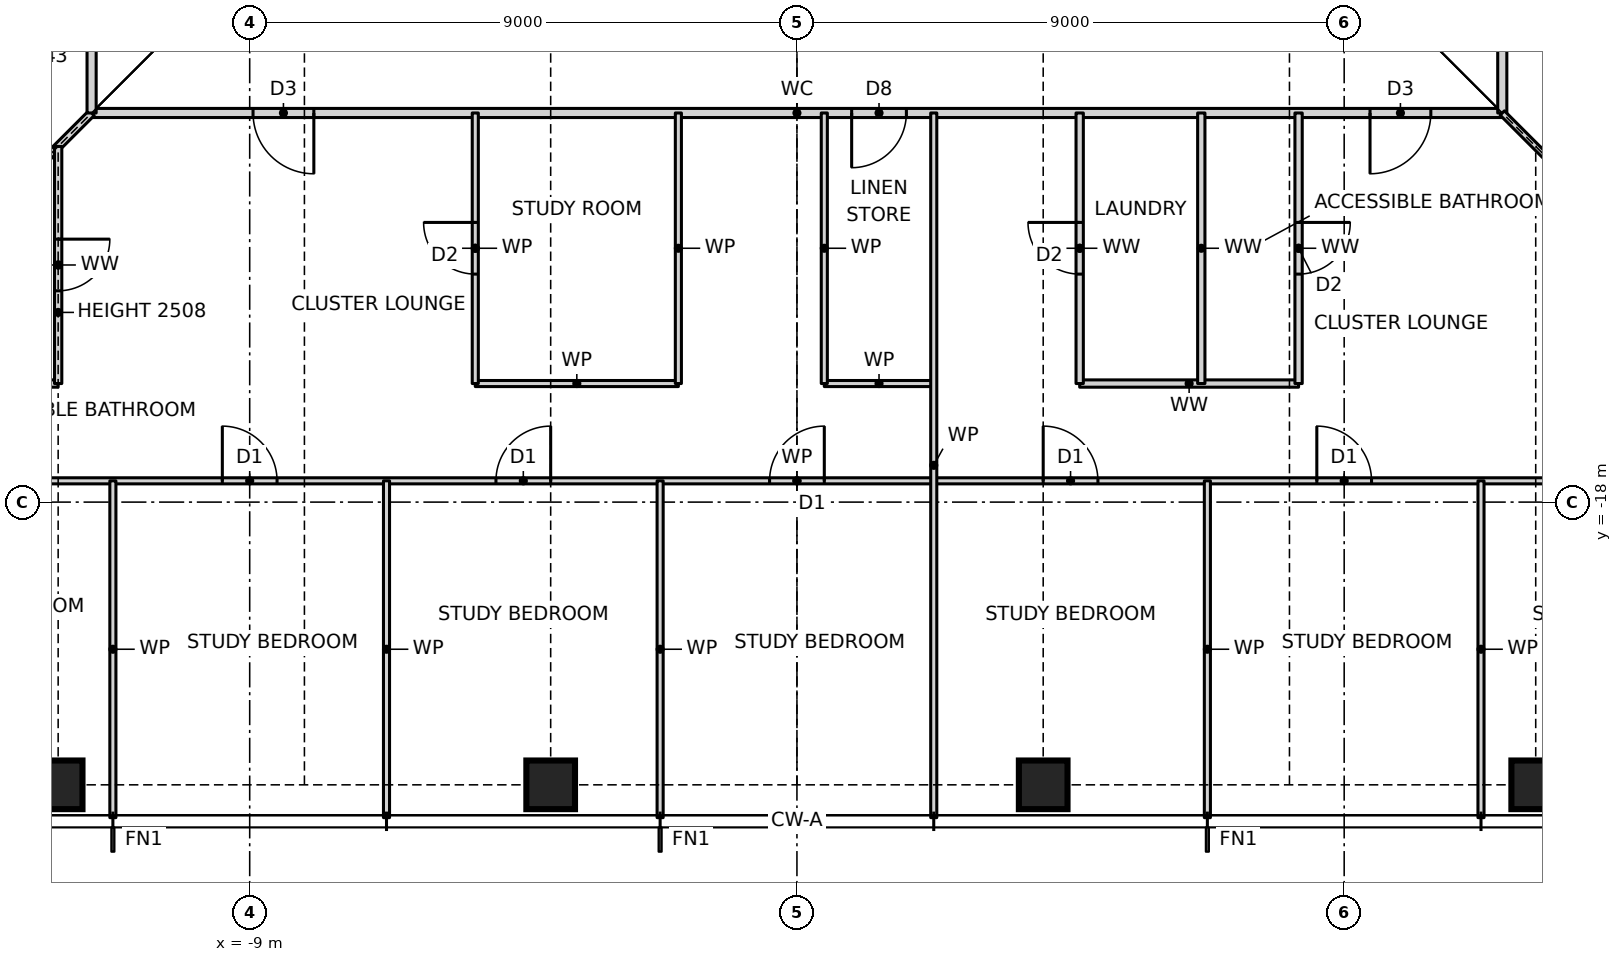
"""IFC4 building model, lengths in metres.
Left out: names, types, materials, properties, quantities, classifications, styles, units other than length and angle.
Written with IfcOpenShell. Run it as: python <this file> out.ifc"""

import sys

from ifc_helpers import new_model, si_unit, direction, frame, frame_2d, origin, origin_2d, place, context, subcontext, project, spatial, rectangle, hollow_rectangle, extrude, element, fill, save


model = new_model("IFC4")
c1 = context("Model", 3, precision=1e-05, world=origin(), true_north=direction((0.0, 1.0)))
c2 = subcontext(c1, "Body", "Model", "MODEL_VIEW")
j1 = project(units=[si_unit("LENGTHUNIT", "METRE"), si_unit("PLANEANGLEUNIT", "RADIAN")], contexts=[c1])
p1 = place(None, origin())
s1 = spatial("IfcSite", under=j1, at=p1, CompositionType="ELEMENT")
p2 = place(p1, origin())
s2 = spatial("IfcBuilding", under=s1, at=p2, CompositionType="ELEMENT")
p3 = place(p2, frame((0.0, 0.0, 60.5)))
s3 = spatial("IfcBuildingStorey", under=s2, at=p3, CompositionType="ELEMENT", Elevation=60.5)
for number, where, z_axis, x_axis in (
    (1, (-12.15, -22.65, 0.0), (0.0, 0.0, 1.0), (1.0, 0.0, 0.0)),
    (2, (-4.05, -22.65, 0.0), (0.0, 0.0, 1.0), (1.0, 0.0, 0.0)),
    (3, (4.05, -22.65, 0.0), (0.0, 0.0, 1.0), (1.0, 0.0, 0.0)),
    (4, (12.15, -22.65, 0.0), (0.0, 0.0, 1.0), (1.0, 0.0, 0.0)),
):
    element("IfcColumn", number, at=place(p3, frame(where, z_axis=z_axis, x_axis=x_axis)), inside=s3, PredefinedType="COLUMN", context=c2, shape_type="SweptSolid", body=[
        extrude(hollow_rectangle(XDim=0.8, YDim=0.8, WallThickness=0.09, at=origin_2d()), origin(), (0.0, 0.0, 1.0), 3.5),
    ])
p4 = place(p3, frame((-15.75, -17.65, 0.0), z_axis=(0.0, 0.0, 1.0), x_axis=(1.0, 0.0, 0.0)))
e5 = element("IfcWall", 5, at=p4, inside=s3, PredefinedType="PARTITIONING", context=c2, shape_type="SweptSolid", body=[
    extrude(rectangle(XDim=31.5, YDim=0.1, at=frame_2d((15.75, 0.0))), origin(), (0.0, 0.0, 1.0), 3.27),
])
p5 = place(p4, frame((1.8, 0.0, 0.0)))
e6 = element("IfcOpeningElement", 6, at=p5, cuts=e5, PredefinedType="OPENING", context=c2, shape_type="SweptSolid", body=[
    extrude(rectangle(XDim=0.9, YDim=2.1, at=frame_2d((0.45, 1.05))), frame((0.0, 0.06, 0.0), z_axis=(0.0, -1.0, 0.0), x_axis=(1.0, 0.0, 0.0)), (0.0, 0.0, 1.0), 0.12),
])
p6 = place(p4, frame((6.3, 0.0, 0.0)))
e7 = element("IfcOpeningElement", 7, at=p6, cuts=e5, PredefinedType="OPENING", context=c2, shape_type="SweptSolid", body=[
    extrude(rectangle(XDim=0.9, YDim=2.1, at=frame_2d((0.45, 1.05))), frame((0.0, 0.06, 0.0), z_axis=(0.0, -1.0, 0.0), x_axis=(1.0, 0.0, 0.0)), (0.0, 0.0, 1.0), 0.12),
])
p7 = place(p4, frame((10.8, 0.0, 0.0)))
e8 = element("IfcOpeningElement", 8, at=p7, cuts=e5, PredefinedType="OPENING", context=c2, shape_type="SweptSolid", body=[
    extrude(rectangle(XDim=0.9, YDim=2.1, at=frame_2d((0.45, 1.05))), frame((0.0, 0.06, 0.0), z_axis=(0.0, -1.0, 0.0), x_axis=(1.0, 0.0, 0.0)), (0.0, 0.0, 1.0), 0.12),
])
p8 = place(p4, frame((15.3, 0.0, 0.0)))
e9 = element("IfcOpeningElement", 9, at=p8, cuts=e5, PredefinedType="OPENING", context=c2, shape_type="SweptSolid", body=[
    extrude(rectangle(XDim=0.9, YDim=2.1, at=frame_2d((0.45, 1.05))), frame((0.0, 0.06, 0.0), z_axis=(0.0, -1.0, 0.0), x_axis=(1.0, 0.0, 0.0)), (0.0, 0.0, 1.0), 0.12),
])
p9 = place(p4, frame((19.8, 0.0, 0.0)))
e10 = element("IfcOpeningElement", 10, at=p9, cuts=e5, PredefinedType="OPENING", context=c2, shape_type="SweptSolid", body=[
    extrude(rectangle(XDim=0.9, YDim=2.1, at=frame_2d((0.45, 1.05))), frame((0.0, 0.06, 0.0), z_axis=(0.0, -1.0, 0.0), x_axis=(1.0, 0.0, 0.0)), (0.0, 0.0, 1.0), 0.12),
])
p10 = place(p4, frame((24.3, 0.0, 0.0)))
e11 = element("IfcOpeningElement", 11, at=p10, cuts=e5, PredefinedType="OPENING", context=c2, shape_type="SweptSolid", body=[
    extrude(rectangle(XDim=0.9, YDim=2.1, at=frame_2d((0.45, 1.05))), frame((0.0, 0.06, 0.0), z_axis=(0.0, -1.0, 0.0), x_axis=(1.0, 0.0, 0.0)), (0.0, 0.0, 1.0), 0.12),
])
p11 = place(p4, frame((28.8, 0.0, 0.0)))
e12 = element("IfcOpeningElement", 12, at=p11, cuts=e5, PredefinedType="OPENING", context=c2, shape_type="SweptSolid", body=[
    extrude(rectangle(XDim=0.9, YDim=2.1, at=frame_2d((0.45, 1.05))), frame((0.0, 0.06, 0.0), z_axis=(0.0, -1.0, 0.0), x_axis=(1.0, 0.0, 0.0)), (0.0, 0.0, 1.0), 0.12),
])
p12 = place(p3, frame((-15.75, -16.05, 0.0), z_axis=(0.0, 0.0, 1.0), x_axis=(1.0, 0.0, 0.0)))
e13 = element("IfcWall", 13, at=p12, inside=s3, PredefinedType="PARTITIONING", context=c2, shape_type="SweptSolid", body=[
    extrude(rectangle(XDim=3.6, YDim=0.12, at=frame_2d((1.8, 0.0))), origin(), (0.0, 0.0, 1.0), 3.27),
])
p13 = place(p3, frame((-5.29, -16.05, 0.0), z_axis=(0.0, 0.0, 1.0), x_axis=(1.0, 0.0, 0.0)))
e14 = element("IfcWall", 14, at=p13, inside=s3, PredefinedType="PARTITIONING", context=c2, shape_type="SweptSolid", body=[
    extrude(rectangle(XDim=3.34, YDim=0.1, at=frame_2d((1.67, 0.0))), origin(), (0.0, 0.0, 1.0), 3.27),
])
p14 = place(p3, frame((0.45, -16.05, 0.0), z_axis=(0.0, 0.0, 1.0), x_axis=(1.0, 0.0, 0.0)))
e15 = element("IfcWall", 15, at=p14, inside=s3, PredefinedType="PARTITIONING", context=c2, shape_type="SweptSolid", body=[
    extrude(rectangle(XDim=1.8, YDim=0.1, at=frame_2d((0.9, 0.0))), origin(), (0.0, 0.0, 1.0), 3.27),
])
p15 = place(p3, frame((4.65, -16.05, 0.0), z_axis=(0.0, 0.0, 1.0), x_axis=(1.0, 0.0, 0.0)))
e16 = element("IfcWall", 16, at=p15, inside=s3, PredefinedType="PARTITIONING", context=c2, shape_type="SweptSolid", body=[
    extrude(rectangle(XDim=3.6, YDim=0.12, at=frame_2d((1.8, 0.0))), origin(), (0.0, 0.0, 1.0), 3.27),
])
p16 = place(p3, frame((-11.6, -11.6, 0.0), z_axis=(0.0, 0.0, 1.0), x_axis=(1.0, 0.0, 0.0)))
e17 = element("IfcWall", 17, at=p16, inside=s3, PredefinedType="PARTITIONING", context=c2, shape_type="SweptSolid", body=[
    extrude(rectangle(XDim=23.2, YDim=0.15, at=frame_2d((11.6, 0.0))), origin(), (0.0, 0.0, 1.0), 3.27),
])
p17 = place(p16, frame((2.655, 0.0, 0.0)))
e18 = element("IfcOpeningElement", 18, at=p17, cuts=e17, PredefinedType="OPENING", context=c2, shape_type="SweptSolid", body=[
    extrude(rectangle(XDim=1.0, YDim=2.1, at=frame_2d((0.5, 1.05))), frame((0.0, 0.085, 0.0), z_axis=(0.0, -1.0, 0.0), x_axis=(1.0, 0.0, 0.0)), (0.0, 0.0, 1.0), 0.17),
])
p18 = place(p16, frame((12.5, 0.0, 0.0)))
e19 = element("IfcOpeningElement", 19, at=p18, cuts=e17, PredefinedType="OPENING", context=c2, shape_type="SweptSolid", body=[
    extrude(rectangle(XDim=0.9, YDim=2.1, at=frame_2d((0.45, 1.05))), frame((0.0, 0.085, 0.0), z_axis=(0.0, -1.0, 0.0), x_axis=(1.0, 0.0, 0.0)), (0.0, 0.0, 1.0), 0.17),
])
p19 = place(p16, frame((21.025, 0.0, 0.0)))
e20 = element("IfcOpeningElement", 20, at=p19, cuts=e17, PredefinedType="OPENING", context=c2, shape_type="SweptSolid", body=[
    extrude(rectangle(XDim=1.0, YDim=2.1, at=frame_2d((0.5, 1.05))), frame((0.0, 0.085, 0.0), z_axis=(0.0, -1.0, 0.0), x_axis=(1.0, 0.0, 0.0)), (0.0, 0.0, 1.0), 0.17),
])
p20 = place(p3, frame((-15.75, -15.75, 0.0), z_axis=(0.0, 0.0, 1.0), x_axis=(0.707106781187, 0.707106781187, 0.0)))
e21 = element("IfcWall", 21, at=p20, inside=s3, PredefinedType="PARTITIONING", context=c2, shape_type="SweptSolid", body=[
    extrude(rectangle(XDim=5.869, YDim=0.12, at=frame_2d((2.935, 0.0))), origin(), (0.0, 0.0, 1.0), 2.343),
])
p21 = place(p3, frame((11.6, -11.6, 0.0), z_axis=(0.0, 0.0, 1.0), x_axis=(0.0, 1.0, 0.0)))
e22 = element("IfcWall", 22, at=p21, inside=s3, PredefinedType="PARTITIONING", context=c2, shape_type="SweptSolid", body=[
    extrude(rectangle(XDim=24.2, YDim=0.15, at=frame_2d((12.1, 0.0))), origin(), (0.0, 0.0, 1.0), 3.27),
])
p22 = place(p21, frame((16.05, 0.0, 0.0)))
e23 = element("IfcOpeningElement", 23, at=p22, cuts=e22, PredefinedType="OPENING", context=c2, shape_type="SweptSolid", body=[
    extrude(rectangle(XDim=1.0, YDim=2.1, at=frame_2d((0.5, 1.05))), frame((0.0, 0.085, 0.0), z_axis=(0.0, -1.0, 0.0), x_axis=(1.0, 0.0, 0.0)), (0.0, 0.0, 1.0), 0.17),
])
p23 = place(p3, frame((11.25, -23.19, 0.0), z_axis=(0.0, 0.0, 1.0), x_axis=(0.0, 1.0, 0.0)))
e24 = element("IfcWall", 24, at=p23, inside=s3, PredefinedType="PARTITIONING", context=c2, shape_type="SweptSolid", body=[
    extrude(rectangle(XDim=5.54, YDim=0.1, at=frame_2d((2.77, 0.0))), origin(), (0.0, 0.0, 1.0), 3.27),
])
p24 = place(p3, frame((8.25, -16.05, 0.0), z_axis=(0.0, 0.0, 1.0), x_axis=(0.0, 1.0, 0.0)))
e25 = element("IfcWall", 25, at=p24, inside=s3, PredefinedType="PARTITIONING", context=c2, shape_type="SweptSolid", body=[
    extrude(rectangle(XDim=4.45, YDim=0.12, at=frame_2d((2.225, 0.0))), origin(), (0.0, 0.0, 1.0), 3.27),
])
p25 = place(p24, frame((1.8, 0.0, 0.0)))
e26 = element("IfcOpeningElement", 26, at=p25, cuts=e25, PredefinedType="OPENING", context=c2, shape_type="SweptSolid", body=[
    extrude(rectangle(XDim=0.85, YDim=2.1, at=frame_2d((0.425, 1.05))), frame((0.0, 0.07, 0.0), z_axis=(0.0, -1.0, 0.0), x_axis=(1.0, 0.0, 0.0)), (0.0, 0.0, 1.0), 0.14),
])
p26 = place(p3, frame((6.75, -23.19, 0.0), z_axis=(0.0, 0.0, 1.0), x_axis=(0.0, 1.0, 0.0)))
e27 = element("IfcWall", 27, at=p26, inside=s3, PredefinedType="PARTITIONING", context=c2, shape_type="SweptSolid", body=[
    extrude(rectangle(XDim=5.54, YDim=0.1, at=frame_2d((2.77, 0.0))), origin(), (0.0, 0.0, 1.0), 3.27),
])
p27 = place(p3, frame((6.65, -16.05, 0.0), z_axis=(0.0, 0.0, 1.0), x_axis=(0.0, 1.0, 0.0)))
e28 = element("IfcWall", 28, at=p27, inside=s3, PredefinedType="PARTITIONING", context=c2, shape_type="SweptSolid", body=[
    extrude(rectangle(XDim=4.45, YDim=0.12, at=frame_2d((2.225, 0.0))), origin(), (0.0, 0.0, 1.0), 3.27),
])
p28 = place(p3, frame((4.65, -16.05, 0.0), z_axis=(0.0, 0.0, 1.0), x_axis=(0.0, 1.0, 0.0)))
e29 = element("IfcWall", 29, at=p28, inside=s3, PredefinedType="PARTITIONING", context=c2, shape_type="SweptSolid", body=[
    extrude(rectangle(XDim=4.45, YDim=0.12, at=frame_2d((2.225, 0.0))), origin(), (0.0, 0.0, 1.0), 3.27),
])
p29 = place(p28, frame((1.8, 0.0, 0.0)))
e30 = element("IfcOpeningElement", 30, at=p29, cuts=e29, PredefinedType="OPENING", context=c2, shape_type="SweptSolid", body=[
    extrude(rectangle(XDim=0.85, YDim=2.1, at=frame_2d((0.425, 1.05))), frame((0.0, 0.07, 0.0), z_axis=(0.0, -1.0, 0.0), x_axis=(1.0, 0.0, 0.0)), (0.0, 0.0, 1.0), 0.14),
])
p30 = place(p3, frame((2.25, -23.19, 0.0), z_axis=(0.0, 0.0, 1.0), x_axis=(0.0, 1.0, 0.0)))
e31 = element("IfcWall", 31, at=p30, inside=s3, PredefinedType="PARTITIONING", context=c2, shape_type="SweptSolid", body=[
    extrude(rectangle(XDim=11.59, YDim=0.1, at=frame_2d((5.795, 0.0))), origin(), (0.0, 0.0, 1.0), 3.27),
])
for number, where, z_axis, x_axis in (
    (32, (0.45, -16.05, 0.0), (0.0, 0.0, 1.0), (0.0, 1.0, 0.0)),
    (33, (-1.95, -16.05, 0.0), (0.0, 0.0, 1.0), (0.0, 1.0, 0.0)),
):
    element("IfcWall", number, at=place(p3, frame(where, z_axis=z_axis, x_axis=x_axis)), inside=s3, PredefinedType="PARTITIONING", context=c2, shape_type="SweptSolid", body=[
        extrude(rectangle(XDim=4.45, YDim=0.1, at=frame_2d((2.225, 0.0))), origin(), (0.0, 0.0, 1.0), 3.27),
    ])
p31 = place(p3, frame((-2.25, -23.19, 0.0), z_axis=(0.0, 0.0, 1.0), x_axis=(0.0, 1.0, 0.0)))
e34 = element("IfcWall", 34, at=p31, inside=s3, PredefinedType="PARTITIONING", context=c2, shape_type="SweptSolid", body=[
    extrude(rectangle(XDim=5.54, YDim=0.1, at=frame_2d((2.77, 0.0))), origin(), (0.0, 0.0, 1.0), 3.27),
])
p32 = place(p3, frame((-5.29, -16.05, 0.0), z_axis=(0.0, 0.0, 1.0), x_axis=(0.0, 1.0, 0.0)))
e35 = element("IfcWall", 35, at=p32, inside=s3, PredefinedType="PARTITIONING", context=c2, shape_type="SweptSolid", body=[
    extrude(rectangle(XDim=4.45, YDim=0.1, at=frame_2d((2.225, 0.0))), origin(), (0.0, 0.0, 1.0), 3.27),
])
p33 = place(p32, frame((1.8, 0.0, 0.0)))
e36 = element("IfcOpeningElement", 36, at=p33, cuts=e35, PredefinedType="OPENING", context=c2, shape_type="SweptSolid", body=[
    extrude(rectangle(XDim=0.85, YDim=2.1, at=frame_2d((0.425, 1.05))), frame((0.0, 0.06, 0.0), z_axis=(0.0, -1.0, 0.0), x_axis=(1.0, 0.0, 0.0)), (0.0, 0.0, 1.0), 0.12),
])
for number, where, z_axis, x_axis in (
    (37, (-6.75, -23.19, 0.0), (0.0, 0.0, 1.0), (0.0, 1.0, 0.0)),
    (38, (-11.25, -23.19, 0.0), (0.0, 0.0, 1.0), (0.0, 1.0, 0.0)),
):
    element("IfcWall", number, at=place(p3, frame(where, z_axis=z_axis, x_axis=x_axis)), inside=s3, PredefinedType="PARTITIONING", context=c2, shape_type="SweptSolid", body=[
        extrude(rectangle(XDim=5.54, YDim=0.1, at=frame_2d((2.77, 0.0))), origin(), (0.0, 0.0, 1.0), 3.27),
    ])
p34 = place(p3, frame((-11.6, -11.6, 0.0), z_axis=(0.0, 0.0, 1.0), x_axis=(0.0, 1.0, 0.0)))
e39 = element("IfcWall", 39, at=p34, inside=s3, PredefinedType="PARTITIONING", context=c2, shape_type="SweptSolid", body=[
    extrude(rectangle(XDim=24.2, YDim=0.15, at=frame_2d((12.1, 0.0))), origin(), (0.0, 0.0, 1.0), 3.27),
])
p35 = place(p34, frame((19.225, 0.0, 0.0)))
e40 = element("IfcOpeningElement", 40, at=p35, cuts=e39, PredefinedType="OPENING", context=c2, shape_type="SweptSolid", body=[
    extrude(rectangle(XDim=1.0, YDim=2.1, at=frame_2d((0.5, 1.05))), frame((0.0, 0.085, 0.0), z_axis=(0.0, -1.0, 0.0), x_axis=(1.0, 0.0, 0.0)), (0.0, 0.0, 1.0), 0.17),
])
p36 = place(p34, frame((3.425, 0.0, 0.0)))
e41 = element("IfcOpeningElement", 41, at=p36, cuts=e39, PredefinedType="OPENING", context=c2, shape_type="SweptSolid", body=[
    extrude(rectangle(XDim=1.0, YDim=2.1, at=frame_2d((0.5, 1.05))), frame((0.0, 0.085, 0.0), z_axis=(0.0, -1.0, 0.0), x_axis=(1.0, 0.0, 0.0)), (0.0, 0.0, 1.0), 0.17),
])
p37 = place(p3, frame((-12.15, -16.05, 0.0), z_axis=(0.0, 0.0, 1.0), x_axis=(0.0, 1.0, 0.0)))
e42 = element("IfcWall", 42, at=p37, inside=s3, PredefinedType="PARTITIONING", context=c2, shape_type="SweptSolid", body=[
    extrude(rectangle(XDim=3.9, YDim=0.12, at=frame_2d((1.95, 0.0))), origin(), (0.0, 0.0, 1.0), 2.508),
])
p38 = place(p37, frame((1.525, 0.0, 0.0)))
e43 = element("IfcOpeningElement", 43, at=p38, cuts=e42, PredefinedType="OPENING", context=c2, shape_type="SweptSolid", body=[
    extrude(rectangle(XDim=0.85, YDim=2.1, at=frame_2d((0.425, 1.05))), frame((0.0, 0.07, 0.0), z_axis=(0.0, -1.0, 0.0), x_axis=(1.0, 0.0, 0.0)), (0.0, 0.0, 1.0), 0.14),
])
p39 = place(p3, frame((15.75, -15.75, 0.0), z_axis=(0.0, 0.0, 1.0), x_axis=(-0.707106781187, 0.707106781187, 0.0)))
e44 = element("IfcWall", 44, at=p39, inside=s3, PredefinedType="PARTITIONING", context=c2, shape_type="SweptSolid", body=[
    extrude(rectangle(XDim=5.869, YDim=0.1, at=frame_2d((2.935, 0.0))), origin(), (0.0, 0.0, 1.0), 2.343),
])
p40 = place(p6, origin())
e45 = element("IfcDoor", 45, at=p40, inside=s3, OperationType="SINGLE_SWING_LEFT", PredefinedType="DOOR", context=c2, shape_type="SweptSolid", body=[
    extrude(rectangle(XDim=0.9, YDim=2.1, at=frame_2d((0.45, 1.05))), frame((0.0, 0.025, 0.0), z_axis=(0.0, -1.0, 0.0), x_axis=(1.0, 0.0, 0.0)), (0.0, 0.0, 1.0), 0.05),
])
fill(e7, e45)
p41 = place(p7, origin())
e46 = element("IfcDoor", 46, at=p41, inside=s3, OperationType="SINGLE_SWING_RIGHT", PredefinedType="DOOR", context=c2, shape_type="SweptSolid", body=[
    extrude(rectangle(XDim=0.9, YDim=2.1, at=frame_2d((0.45, 1.05))), frame((0.0, 0.025, 0.0), z_axis=(0.0, -1.0, 0.0), x_axis=(1.0, 0.0, 0.0)), (0.0, 0.0, 1.0), 0.05),
])
fill(e8, e46)
p42 = place(p8, origin())
e47 = element("IfcDoor", 47, at=p42, inside=s3, OperationType="SINGLE_SWING_RIGHT", PredefinedType="DOOR", context=c2, shape_type="SweptSolid", body=[
    extrude(rectangle(XDim=0.9, YDim=2.1, at=frame_2d((0.45, 1.05))), frame((0.0, 0.025, 0.0), z_axis=(0.0, -1.0, 0.0), x_axis=(1.0, 0.0, 0.0)), (0.0, 0.0, 1.0), 0.05),
])
fill(e9, e47)
p43 = place(p17, frame((1.0, 0.0, 0.0), z_axis=(0.0, 0.0, 1.0), x_axis=(-1.0, 0.0, 0.0)))
e48 = element("IfcDoor", 48, at=p43, inside=s3, OperationType="SINGLE_SWING_LEFT", PredefinedType="DOOR", context=c2, shape_type="SweptSolid", body=[
    extrude(rectangle(XDim=1.0, YDim=2.1, at=frame_2d((0.5, 1.05))), frame((0.0, 0.025, 0.0), z_axis=(0.0, -1.0, 0.0), x_axis=(1.0, 0.0, 0.0)), (0.0, 0.0, 1.0), 0.05),
])
fill(e18, e48)
p44 = place(p38, frame((0.85, 0.0, 0.0), z_axis=(0.0, 0.0, 1.0), x_axis=(-1.0, 0.0, 0.0)))
e49 = element("IfcDoor", 49, at=p44, inside=s3, OperationType="SINGLE_SWING_LEFT", PredefinedType="DOOR", context=c2, shape_type="SweptSolid", body=[
    extrude(rectangle(XDim=0.85, YDim=2.1, at=frame_2d((0.425, 1.05))), frame((0.0, 0.025, 0.0), z_axis=(0.0, -1.0, 0.0), x_axis=(1.0, 0.0, 0.0)), (0.0, 0.0, 1.0), 0.05),
])
fill(e43, e49)
p45 = place(p33, origin())
e50 = element("IfcDoor", 50, at=p45, inside=s3, OperationType="SINGLE_SWING_RIGHT", PredefinedType="DOOR", context=c2, shape_type="SweptSolid", body=[
    extrude(rectangle(XDim=0.85, YDim=2.1, at=frame_2d((0.425, 1.05))), frame((0.0, 0.025, 0.0), z_axis=(0.0, -1.0, 0.0), x_axis=(1.0, 0.0, 0.0)), (0.0, 0.0, 1.0), 0.05),
])
fill(e36, e50)
p46 = place(p18, frame((0.9, 0.0, 0.0), z_axis=(0.0, 0.0, 1.0), x_axis=(-1.0, 0.0, 0.0)))
e51 = element("IfcDoor", 51, at=p46, inside=s3, OperationType="SINGLE_SWING_RIGHT", PredefinedType="DOOR", context=c2, shape_type="SweptSolid", body=[
    extrude(rectangle(XDim=0.9, YDim=2.1, at=frame_2d((0.45, 1.05))), frame((0.0, 0.025, 0.0), z_axis=(0.0, -1.0, 0.0), x_axis=(1.0, 0.0, 0.0)), (0.0, 0.0, 1.0), 0.05),
])
fill(e19, e51)
p47 = place(p9, origin())
e52 = element("IfcDoor", 52, at=p47, inside=s3, OperationType="SINGLE_SWING_LEFT", PredefinedType="DOOR", context=c2, shape_type="SweptSolid", body=[
    extrude(rectangle(XDim=0.9, YDim=2.1, at=frame_2d((0.45, 1.05))), frame((0.0, 0.025, 0.0), z_axis=(0.0, -1.0, 0.0), x_axis=(1.0, 0.0, 0.0)), (0.0, 0.0, 1.0), 0.05),
])
fill(e10, e52)
p48 = place(p10, origin())
e53 = element("IfcDoor", 53, at=p48, inside=s3, OperationType="SINGLE_SWING_LEFT", PredefinedType="DOOR", context=c2, shape_type="SweptSolid", body=[
    extrude(rectangle(XDim=0.9, YDim=2.1, at=frame_2d((0.45, 1.05))), frame((0.0, 0.025, 0.0), z_axis=(0.0, -1.0, 0.0), x_axis=(1.0, 0.0, 0.0)), (0.0, 0.0, 1.0), 0.05),
])
fill(e11, e53)
p49 = place(p19, frame((1.0, 0.0, 0.0), z_axis=(0.0, 0.0, 1.0), x_axis=(-1.0, 0.0, 0.0)))
e54 = element("IfcDoor", 54, at=p49, inside=s3, OperationType="SINGLE_SWING_RIGHT", PredefinedType="DOOR", context=c2, shape_type="SweptSolid", body=[
    extrude(rectangle(XDim=1.0, YDim=2.1, at=frame_2d((0.5, 1.05))), frame((0.0, 0.025, 0.0), z_axis=(0.0, -1.0, 0.0), x_axis=(1.0, 0.0, 0.0)), (0.0, 0.0, 1.0), 0.05),
])
fill(e20, e54)
p50 = place(p29, origin())
e55 = element("IfcDoor", 55, at=p50, inside=s3, OperationType="SINGLE_SWING_RIGHT", PredefinedType="DOOR", context=c2, shape_type="SweptSolid", body=[
    extrude(rectangle(XDim=0.85, YDim=2.1, at=frame_2d((0.425, 1.05))), frame((0.0, 0.025, 0.0), z_axis=(0.0, -1.0, 0.0), x_axis=(1.0, 0.0, 0.0)), (0.0, 0.0, 1.0), 0.05),
])
fill(e30, e55)
p51 = place(p25, frame((0.85, 0.0, 0.0), z_axis=(0.0, 0.0, 1.0), x_axis=(-1.0, 0.0, 0.0)))
e56 = element("IfcDoor", 56, at=p51, inside=s3, OperationType="SINGLE_SWING_LEFT", PredefinedType="DOOR", context=c2, shape_type="SweptSolid", body=[
    extrude(rectangle(XDim=0.85, YDim=2.1, at=frame_2d((0.425, 1.05))), frame((0.0, 0.025, 0.0), z_axis=(0.0, -1.0, 0.0), x_axis=(1.0, 0.0, 0.0)), (0.0, 0.0, 1.0), 0.05),
])
fill(e26, e56)
save(model, sys.argv[1])
